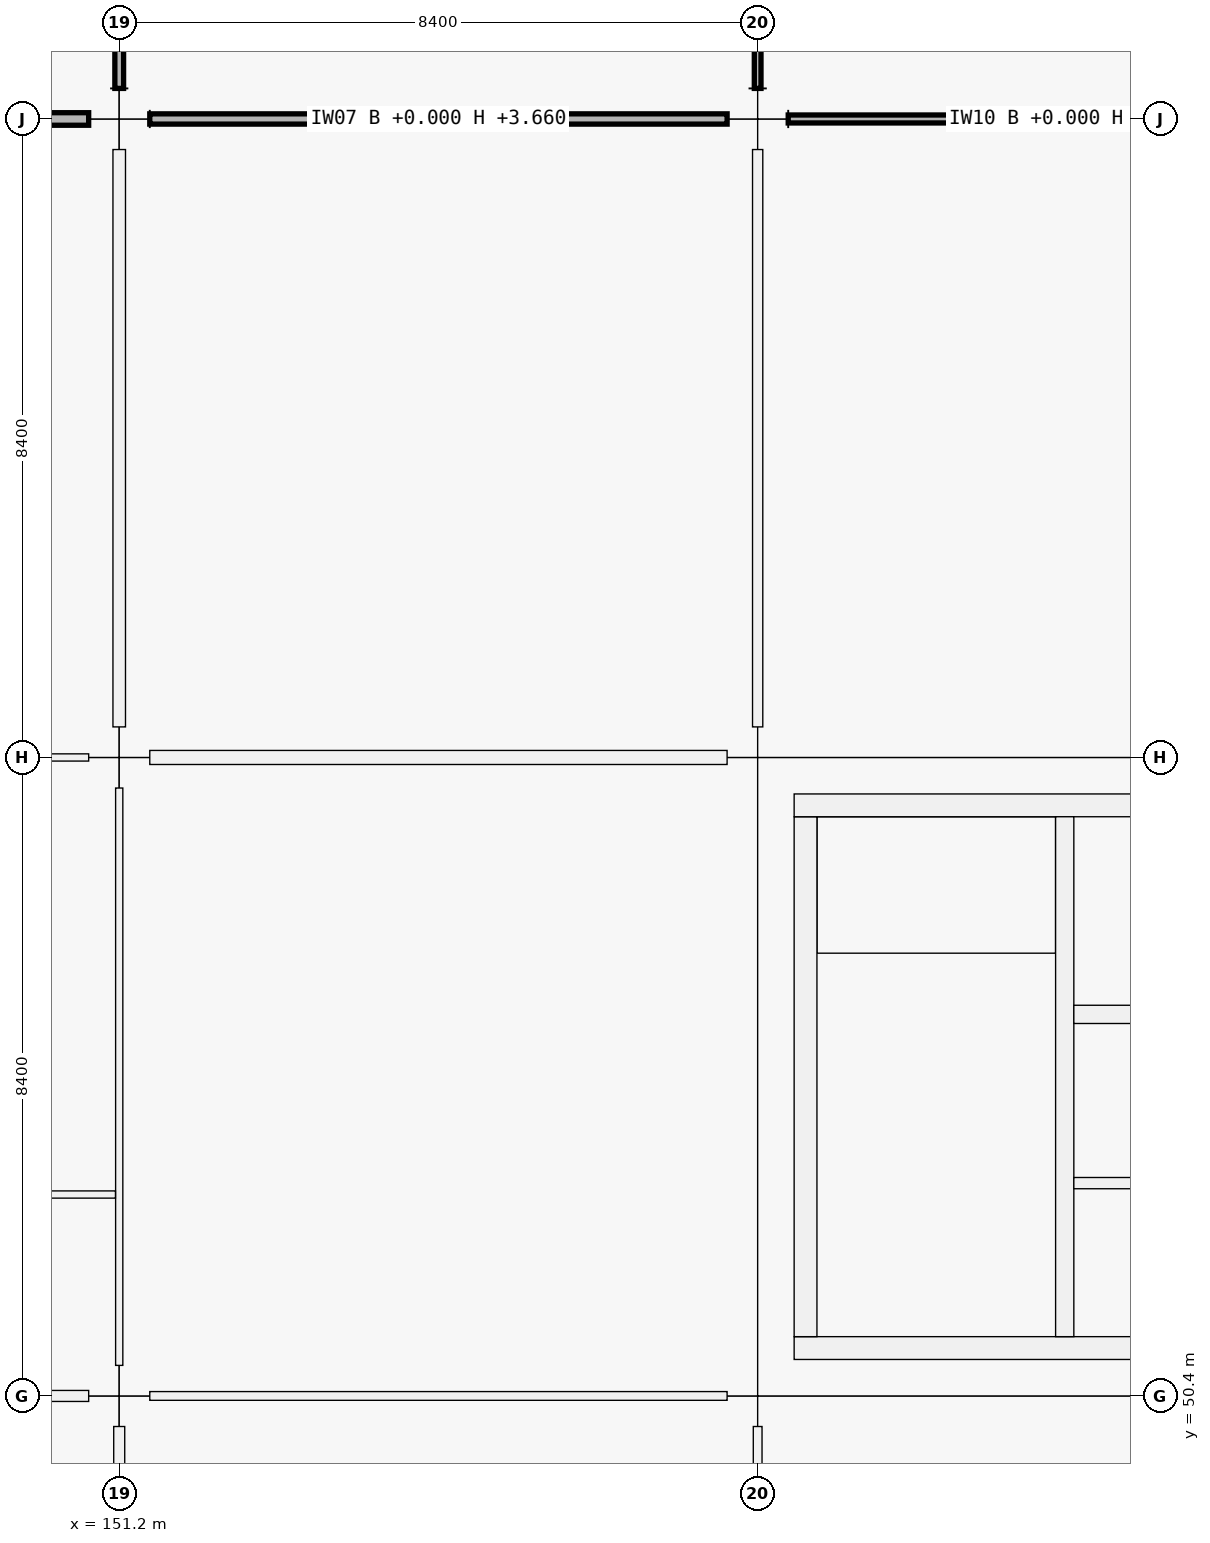
"""IFC4 building model, lengths in metres.
Left out: names, types, materials, properties, quantities, classifications, styles, units other than length and angle.
Written with IfcOpenShell. Run it as: python <this file> out.ifc"""

import sys

from ifc_helpers import new_model, si_unit, direction, frame, frame_2d, origin, origin_2d, place, context, subcontext, project, spatial, rectangle, extrude, element, fill, save


model = new_model("IFC4")
c1 = context("Model", 3, precision=1e-05, world=origin(), true_north=direction((0.0, 1.0)))
c2 = subcontext(c1, "Body", "Model", "MODEL_VIEW")
j1 = project(units=[si_unit("LENGTHUNIT", "METRE"), si_unit("PLANEANGLEUNIT", "RADIAN")], contexts=[c1])
p1 = place(None, origin())
s1 = spatial("IfcSite", under=j1, at=p1, CompositionType="ELEMENT")
p2 = place(p1, origin())
s2 = spatial("IfcBuilding", under=s1, at=p2, CompositionType="ELEMENT")
p3 = place(p2, origin())
s3 = spatial("IfcBuildingStorey", under=s2, at=p3, CompositionType="ELEMENT", Elevation=0.0)
for number, where, z_axis, x_axis in (
    (1, (151.2, 50.4, 0.0), (0.0, 0.0, 1.0), (1.0, 0.0, 0.0)),
    (2, (151.2, 58.8, 0.0), (0.0, 0.0, 1.0), (1.0, 0.0, 0.0)),
    (3, (151.2, 67.2, 0.0), (0.0, 0.0, 1.0), (1.0, 0.0, 0.0)),
    (4, (159.6, 50.4, 0.0), (0.0, 0.0, 1.0), (1.0, 0.0, 0.0)),
    (5, (159.6, 58.8, 0.0), (0.0, 0.0, 1.0), (1.0, 0.0, 0.0)),
    (6, (159.6, 67.2, 0.0), (0.0, 0.0, 1.0), (1.0, 0.0, 0.0)),
):
    element("IfcColumn", number, at=place(p3, frame(where, z_axis=z_axis, x_axis=x_axis)), inside=s3, PredefinedType="COLUMN", context=c2, shape_type="SweptSolid", body=[
        extrude(rectangle(XDim=0.8, YDim=0.8, at=origin_2d()), origin(), (0.0, 0.0, 1.0), 5.76),
    ])
p4 = place(p3, frame((167.52, 51.03, 0.0), z_axis=(0.0, 0.0, 1.0), x_axis=(-1.0, 0.0, 0.0)))
e7 = element("IfcWall", 7, at=p4, inside=s3, PredefinedType="SHEAR", context=c2, shape_type="SweptSolid", body=[
    extrude(rectangle(XDim=7.44, YDim=0.3, at=frame_2d((3.72, 0.0))), origin(), (0.0, 0.0, 1.0), 5.76),
])
p5 = place(p4, frame((1.28, 0.0, 0.0)))
e8 = element("IfcOpeningElement", 8, at=p5, cuts=e7, PredefinedType="OPENING", context=c2, shape_type="SweptSolid", body=[
    extrude(rectangle(XDim=1.5, YDim=2.15, at=frame_2d((0.75, 1.075))), frame((0.0, 0.15, 0.0), z_axis=(0.0, -1.0, 0.0), x_axis=(1.0, 0.0, 0.0)), (0.0, 0.0, 1.0), 0.3),
])
p6 = place(p3, frame((160.23, 51.18, 0.0), z_axis=(0.0, 0.0, 1.0), x_axis=(0.0, 1.0, 0.0)))
e9 = element("IfcWall", 9, at=p6, inside=s3, PredefinedType="SHEAR", context=c2, shape_type="SweptSolid", body=[
    extrude(rectangle(XDim=6.84, YDim=0.3, at=frame_2d((3.42, 0.0))), origin(), (0.0, 0.0, 1.0), 5.76),
])
p7 = place(p3, frame((160.08, 58.17, 0.0), z_axis=(0.0, 0.0, 1.0), x_axis=(1.0, 0.0, 0.0)))
e10 = element("IfcWall", 10, at=p7, inside=s3, PredefinedType="SHEAR", context=c2, shape_type="SweptSolid", body=[
    extrude(rectangle(XDim=7.44, YDim=0.3, at=frame_2d((3.72, 0.0))), origin(), (0.0, 0.0, 1.0), 5.76),
])
p8 = place(p3, frame((163.64, 51.18, 0.0), z_axis=(0.0, 0.0, 1.0), x_axis=(0.0, 1.0, 0.0)))
e11 = element("IfcWall", 11, at=p8, inside=s3, PredefinedType="SHEAR", context=c2, shape_type="SweptSolid", body=[
    extrude(rectangle(XDim=6.84, YDim=0.24, at=frame_2d((3.42, 0.0))), origin(), (0.0, 0.0, 1.0), 5.76),
])
p9 = place(p8, frame((0.12, 0.0, 0.0)))
e12 = element("IfcOpeningElement", 12, at=p9, cuts=e11, PredefinedType="OPENING", context=c2, shape_type="SweptSolid", body=[
    extrude(rectangle(XDim=1.0, YDim=2.15, at=frame_2d((0.5, 1.075))), frame((0.0, 0.12, 0.0), z_axis=(0.0, -1.0, 0.0), x_axis=(1.0, 0.0, 0.0)), (0.0, 0.0, 1.0), 0.24),
])
p10 = place(p3, frame((163.76, 55.42, 0.0), z_axis=(0.0, 0.0, 1.0), x_axis=(1.0, 0.0, 0.0)))
e13 = element("IfcWall", 13, at=p10, inside=s3, PredefinedType="SHEAR", context=c2, shape_type="SweptSolid", body=[
    extrude(rectangle(XDim=3.46, YDim=0.24, at=frame_2d((1.73, 0.0))), origin(), (0.0, 0.0, 1.0), 5.76),
])
p11 = place(p10, frame((1.08, 0.0, 0.0)))
e14 = element("IfcOpeningElement", 14, at=p11, cuts=e13, PredefinedType="OPENING", context=c2, shape_type="SweptSolid", body=[
    extrude(rectangle(XDim=1.3, YDim=2.25, at=frame_2d((0.65, 1.125))), frame((0.0, 0.12, 0.0), z_axis=(0.0, -1.0, 0.0), x_axis=(1.0, 0.0, 0.0)), (0.0, 0.0, 1.0), 0.24),
])
p12 = place(p3, frame((167.22, 53.2, 0.0), z_axis=(0.0, 0.0, 1.0), x_axis=(-1.0, 0.0, 0.0)))
e15 = element("IfcWall", 15, at=p12, inside=s3, PredefinedType="PARTITIONING", context=c2, shape_type="SweptSolid", body=[
    extrude(rectangle(XDim=3.46, YDim=0.148, at=frame_2d((1.73, 0.0))), origin(), (0.0, 0.0, 1.0), 5.51),
])
p13 = place(p12, frame((0.98, 0.0, 0.0)))
e16 = element("IfcOpeningElement", 16, at=p13, cuts=e15, PredefinedType="OPENING", context=c2, shape_type="SweptSolid", body=[
    extrude(rectangle(XDim=1.5, YDim=2.15, at=frame_2d((0.75, 1.075))), frame((0.0, 0.074, 0.0), z_axis=(0.0, -1.0, 0.0), x_axis=(1.0, 0.0, 0.0)), (0.0, 0.0, 1.0), 0.148),
])
p14 = place(p3, frame((143.202, 50.4, 0.0), z_axis=(0.0, 0.0, 1.0), x_axis=(1.0, 0.0, 0.0)))
e17 = element("IfcWall", 17, at=p14, inside=s3, PredefinedType="PARTITIONING", context=c2, shape_type="SweptSolid", body=[
    extrude(rectangle(XDim=7.596, YDim=0.145, at=frame_2d((3.798, 0.0))), origin(), (0.0, 0.0, 1.0), 3.66),
])
p15 = place(p3, frame((143.202, 58.8, 0.0), z_axis=(0.0, 0.0, 1.0), x_axis=(1.0, 0.0, 0.0)))
e18 = element("IfcWall", 18, at=p15, inside=s3, PredefinedType="PARTITIONING", context=c2, shape_type="SweptSolid", body=[
    extrude(rectangle(XDim=7.596, YDim=0.095, at=frame_2d((3.798, 0.0))), origin(), (0.0, 0.0, 1.0), 3.66),
])
p16 = place(p3, frame((143.202, 67.2, 0.0), z_axis=(0.0, 0.0, 1.0), x_axis=(1.0, 0.0, 0.0)))
e19 = element("IfcWall", 19, at=p16, inside=s3, PredefinedType="PARTITIONING", context=c2, shape_type="SweptSolid", body=[
    extrude(rectangle(XDim=7.596, YDim=0.165, at=frame_2d((3.798, 0.0))), origin(), (0.0, 0.0, 1.0), 3.66),
])
p17 = place(p16, frame((3.278, 0.0, 0.0)))
e20 = element("IfcOpeningElement", 20, at=p17, cuts=e19, PredefinedType="OPENING", context=c2, shape_type="SweptSolid", body=[
    extrude(rectangle(XDim=1.04, YDim=2.2, at=frame_2d((0.52, 1.1))), frame((0.0, 0.083, 0.0), z_axis=(0.0, -1.0, 0.0), x_axis=(1.0, 0.0, 0.0)), (0.0, 0.0, 1.0), 0.165),
])
p18 = place(p3, frame((151.602, 50.4, 0.0), z_axis=(0.0, 0.0, 1.0), x_axis=(1.0, 0.0, 0.0)))
e21 = element("IfcWall", 21, at=p18, inside=s3, PredefinedType="PARTITIONING", context=c2, shape_type="SweptSolid", body=[
    extrude(rectangle(XDim=7.596, YDim=0.115, at=frame_2d((3.798, 0.0))), origin(), (0.0, 0.0, 1.0), 3.66),
])
p19 = place(p18, frame((3.308, 0.0, 0.0)))
e22 = element("IfcOpeningElement", 22, at=p19, cuts=e21, PredefinedType="OPENING", context=c2, shape_type="SweptSolid", body=[
    extrude(rectangle(XDim=0.98, YDim=2.18, at=frame_2d((0.49, 1.09))), frame((0.0, 0.058, 0.0), z_axis=(0.0, -1.0, 0.0), x_axis=(1.0, 0.0, 0.0)), (0.0, 0.0, 1.0), 0.115),
])
p20 = place(p3, frame((151.602, 58.8, 0.0), z_axis=(0.0, 0.0, 1.0), x_axis=(1.0, 0.0, 0.0)))
e23 = element("IfcWall", 23, at=p20, inside=s3, PredefinedType="PARTITIONING", context=c2, shape_type="SweptSolid", body=[
    extrude(rectangle(XDim=7.596, YDim=0.185, at=frame_2d((3.798, 0.0))), origin(), (0.0, 0.0, 1.0), 3.66),
])
p21 = place(p20, frame((3.318, 0.0, 0.0)))
e24 = element("IfcOpeningElement", 24, at=p21, cuts=e23, PredefinedType="OPENING", context=c2, shape_type="SweptSolid", body=[
    extrude(rectangle(XDim=0.96, YDim=2.18, at=frame_2d((0.48, 1.09))), frame((0.0, 0.093, 0.0), z_axis=(0.0, -1.0, 0.0), x_axis=(1.0, 0.0, 0.0)), (0.0, 0.0, 1.0), 0.185),
])
p22 = place(p3, frame((151.602, 67.2, 0.0), z_axis=(0.0, 0.0, 1.0), x_axis=(1.0, 0.0, 0.0)))
e25 = element("IfcWall", 25, at=p22, inside=s3, PredefinedType="PARTITIONING", context=c2, shape_type="SweptSolid", body=[
    extrude(rectangle(XDim=7.596, YDim=0.135, at=frame_2d((3.798, 0.0))), origin(), (0.0, 0.0, 1.0), 3.66),
])
p23 = place(p22, frame((3.328, 0.0, 0.0)))
e26 = element("IfcOpeningElement", 26, at=p23, cuts=e25, PredefinedType="OPENING", context=c2, shape_type="SweptSolid", body=[
    extrude(rectangle(XDim=0.94, YDim=2.15, at=frame_2d((0.47, 1.075))), frame((0.0, 0.067, 0.0), z_axis=(0.0, -1.0, 0.0), x_axis=(1.0, 0.0, 0.0)), (0.0, 0.0, 1.0), 0.135),
])
p24 = place(p3, frame((160.002, 67.2, 0.0), z_axis=(0.0, 0.0, 1.0), x_axis=(1.0, 0.0, 0.0)))
e27 = element("IfcWall", 27, at=p24, inside=s3, PredefinedType="PARTITIONING", context=c2, shape_type="SweptSolid", body=[
    extrude(rectangle(XDim=7.596, YDim=0.105, at=frame_2d((3.798, 0.0))), origin(), (0.0, 0.0, 1.0), 3.66),
])
p25 = place(p24, frame((3.273, 0.0, 0.0)))
e28 = element("IfcOpeningElement", 28, at=p25, cuts=e27, PredefinedType="OPENING", context=c2, shape_type="SweptSolid", body=[
    extrude(rectangle(XDim=1.05, YDim=2.12, at=frame_2d((0.525, 1.06))), frame((0.0, 0.052, 0.0), z_axis=(0.0, -1.0, 0.0), x_axis=(1.0, 0.0, 0.0)), (0.0, 0.0, 1.0), 0.105),
])
p26 = place(p3, frame((151.2, 42.352, 0.0), z_axis=(0.0, 0.0, 1.0), x_axis=(0.0, 1.0, 0.0)))
e29 = element("IfcWall", 29, at=p26, inside=s3, PredefinedType="PARTITIONING", context=c2, shape_type="SweptSolid", body=[
    extrude(rectangle(XDim=7.646, YDim=0.145, at=frame_2d((3.823, 0.0))), origin(), (0.0, 0.0, 1.0), 3.66),
])
p27 = place(p26, frame((3.333, 0.0, 0.0)))
e30 = element("IfcOpeningElement", 30, at=p27, cuts=e29, PredefinedType="OPENING", context=c2, shape_type="SweptSolid", body=[
    extrude(rectangle(XDim=0.98, YDim=2.18, at=frame_2d((0.49, 1.09))), frame((0.0, 0.073, 0.0), z_axis=(0.0, -1.0, 0.0), x_axis=(1.0, 0.0, 0.0)), (0.0, 0.0, 1.0), 0.145),
])
p28 = place(p3, frame((151.2, 50.802, 0.0), z_axis=(0.0, 0.0, 1.0), x_axis=(0.0, 1.0, 0.0)))
e31 = element("IfcWall", 31, at=p28, inside=s3, PredefinedType="PARTITIONING", context=c2, shape_type="SweptSolid", body=[
    extrude(rectangle(XDim=7.596, YDim=0.095, at=frame_2d((3.798, 0.0))), origin(), (0.0, 0.0, 1.0), 3.66),
])
p29 = place(p3, frame((151.2, 59.202, 0.0), z_axis=(0.0, 0.0, 1.0), x_axis=(0.0, 1.0, 0.0)))
e32 = element("IfcWall", 32, at=p29, inside=s3, PredefinedType="PARTITIONING", context=c2, shape_type="SweptSolid", body=[
    extrude(rectangle(XDim=7.596, YDim=0.165, at=frame_2d((3.798, 0.0))), origin(), (0.0, 0.0, 1.0), 3.66),
])
p30 = place(p29, frame((3.318, 0.0, 0.0)))
e33 = element("IfcOpeningElement", 33, at=p30, cuts=e32, PredefinedType="OPENING", context=c2, shape_type="SweptSolid", body=[
    extrude(rectangle(XDim=0.96, YDim=2.18, at=frame_2d((0.48, 1.09))), frame((0.0, 0.083, 0.0), z_axis=(0.0, -1.0, 0.0), x_axis=(1.0, 0.0, 0.0)), (0.0, 0.0, 1.0), 0.165),
])
p31 = place(p3, frame((151.2, 67.602, 0.0), z_axis=(0.0, 0.0, 1.0), x_axis=(0.0, 1.0, 0.0)))
e34 = element("IfcWall", 34, at=p31, inside=s3, PredefinedType="PARTITIONING", context=c2, shape_type="SweptSolid", body=[
    extrude(rectangle(XDim=7.696, YDim=0.115, at=frame_2d((3.848, 0.0))), origin(), (0.0, 0.0, 1.0), 3.66),
])
p32 = place(p31, frame((3.378, 0.0, 0.0)))
e35 = element("IfcOpeningElement", 35, at=p32, cuts=e34, PredefinedType="OPENING", context=c2, shape_type="SweptSolid", body=[
    extrude(rectangle(XDim=0.94, YDim=2.15, at=frame_2d((0.47, 1.075))), frame((0.0, 0.058, 0.0), z_axis=(0.0, -1.0, 0.0), x_axis=(1.0, 0.0, 0.0)), (0.0, 0.0, 1.0), 0.115),
])
p33 = place(p3, frame((159.6, 42.402, 0.0), z_axis=(0.0, 0.0, 1.0), x_axis=(0.0, 1.0, 0.0)))
e36 = element("IfcWall", 36, at=p33, inside=s3, PredefinedType="PARTITIONING", context=c2, shape_type="SweptSolid", body=[
    extrude(rectangle(XDim=7.596, YDim=0.115, at=frame_2d((3.798, 0.0))), origin(), (0.0, 0.0, 1.0), 3.66),
])
p34 = place(p33, frame((3.338, 0.0, 0.0)))
e37 = element("IfcOpeningElement", 37, at=p34, cuts=e36, PredefinedType="OPENING", context=c2, shape_type="SweptSolid", body=[
    extrude(rectangle(XDim=0.92, YDim=2.15, at=frame_2d((0.46, 1.075))), frame((0.0, 0.058, 0.0), z_axis=(0.0, -1.0, 0.0), x_axis=(1.0, 0.0, 0.0)), (0.0, 0.0, 1.0), 0.115),
])
p35 = place(p3, frame((159.6, 59.202, 0.0), z_axis=(0.0, 0.0, 1.0), x_axis=(0.0, 1.0, 0.0)))
e38 = element("IfcWall", 38, at=p35, inside=s3, PredefinedType="PARTITIONING", context=c2, shape_type="SweptSolid", body=[
    extrude(rectangle(XDim=7.596, YDim=0.135, at=frame_2d((3.798, 0.0))), origin(), (0.0, 0.0, 1.0), 3.66),
])
p36 = place(p35, frame((3.288, 0.0, 0.0)))
e39 = element("IfcOpeningElement", 39, at=p36, cuts=e38, PredefinedType="OPENING", context=c2, shape_type="SweptSolid", body=[
    extrude(rectangle(XDim=1.02, YDim=2.2, at=frame_2d((0.51, 1.1))), frame((0.0, 0.067, 0.0), z_axis=(0.0, -1.0, 0.0), x_axis=(1.0, 0.0, 0.0)), (0.0, 0.0, 1.0), 0.135),
])
p37 = place(p3, frame((159.6, 67.602, 0.0), z_axis=(0.0, 0.0, 1.0), x_axis=(0.0, 1.0, 0.0)))
e40 = element("IfcWall", 40, at=p37, inside=s3, PredefinedType="PARTITIONING", context=c2, shape_type="SweptSolid", body=[
    extrude(rectangle(XDim=7.671, YDim=0.088, at=frame_2d((3.835, 0.0))), origin(), (0.0, 0.0, 1.0), 3.66),
])
p38 = place(p37, frame((3.331, 0.0, 0.0)))
e41 = element("IfcOpeningElement", 41, at=p38, cuts=e40, PredefinedType="OPENING", context=c2, shape_type="SweptSolid", body=[
    extrude(rectangle(XDim=1.01, YDim=2.12, at=frame_2d((0.505, 1.06))), frame((0.0, 0.044, 0.0), z_axis=(0.0, -1.0, 0.0), x_axis=(1.0, 0.0, 0.0)), (0.0, 0.0, 1.0), 0.088),
])
p39 = place(p3, frame((142.865, 53.05, 0.0), z_axis=(0.0, 0.0, 1.0), x_axis=(1.0, 0.0, 0.0)))
e42 = element("IfcWall", 42, at=p39, inside=s3, PredefinedType="PARTITIONING", context=c2, shape_type="SweptSolid", body=[
    extrude(rectangle(XDim=8.286, YDim=0.095, at=frame_2d((4.143, 0.0))), origin(), (0.0, 0.0, 1.0), 3.66),
])
p40 = place(p9, origin())
e43 = element("IfcDoor", 43, at=p40, inside=s3, OperationType="SINGLE_SWING_LEFT", PredefinedType="DOOR", context=c2, shape_type="SweptSolid", body=[
    extrude(rectangle(XDim=1.0, YDim=2.15, at=frame_2d((0.5, 1.075))), frame((0.0, 0.025, 0.0), z_axis=(0.0, -1.0, 0.0), x_axis=(1.0, 0.0, 0.0)), (0.0, 0.0, 1.0), 0.05),
])
fill(e12, e43)
p41 = place(p19, origin())
e44 = element("IfcDoor", 44, at=p41, inside=s3, OperationType="SINGLE_SWING_RIGHT", PredefinedType="DOOR", context=c2, shape_type="SweptSolid", body=[
    extrude(rectangle(XDim=0.98, YDim=2.18, at=frame_2d((0.49, 1.09))), frame((0.0, 0.025, 0.0), z_axis=(0.0, -1.0, 0.0), x_axis=(1.0, 0.0, 0.0)), (0.0, 0.0, 1.0), 0.05),
])
fill(e22, e44)
p42 = place(p21, origin())
e45 = element("IfcDoor", 45, at=p42, inside=s3, OperationType="SINGLE_SWING_LEFT", PredefinedType="DOOR", context=c2, shape_type="SweptSolid", body=[
    extrude(rectangle(XDim=0.96, YDim=2.18, at=frame_2d((0.48, 1.09))), frame((0.0, 0.025, 0.0), z_axis=(0.0, -1.0, 0.0), x_axis=(1.0, 0.0, 0.0)), (0.0, 0.0, 1.0), 0.05),
])
fill(e24, e45)
p43 = place(p23, origin())
e46 = element("IfcDoor", 46, at=p43, inside=s3, OperationType="SINGLE_SWING_RIGHT", PredefinedType="DOOR", context=c2, shape_type="SweptSolid", body=[
    extrude(rectangle(XDim=0.94, YDim=2.15, at=frame_2d((0.47, 1.075))), frame((0.0, 0.025, 0.0), z_axis=(0.0, -1.0, 0.0), x_axis=(1.0, 0.0, 0.0)), (0.0, 0.0, 1.0), 0.05),
])
fill(e26, e46)
p44 = place(p25, origin())
e47 = element("IfcDoor", 47, at=p44, inside=s3, OperationType="SINGLE_SWING_RIGHT", PredefinedType="DOOR", context=c2, shape_type="SweptSolid", body=[
    extrude(rectangle(XDim=1.05, YDim=2.12, at=frame_2d((0.525, 1.06))), frame((0.0, 0.025, 0.0), z_axis=(0.0, -1.0, 0.0), x_axis=(1.0, 0.0, 0.0)), (0.0, 0.0, 1.0), 0.05),
])
fill(e28, e47)
p45 = place(p36, origin())
e48 = element("IfcDoor", 48, at=p45, inside=s3, OperationType="SINGLE_SWING_LEFT", PredefinedType="DOOR", context=c2, shape_type="SweptSolid", body=[
    extrude(rectangle(XDim=1.02, YDim=2.2, at=frame_2d((0.51, 1.1))), frame((0.0, 0.025, 0.0), z_axis=(0.0, -1.0, 0.0), x_axis=(1.0, 0.0, 0.0)), (0.0, 0.0, 1.0), 0.05),
])
fill(e39, e48)
p46 = place(p30, origin())
e49 = element("IfcDoor", 49, at=p46, inside=s3, OperationType="SINGLE_SWING_RIGHT", PredefinedType="DOOR", context=c2, shape_type="SweptSolid", body=[
    extrude(rectangle(XDim=0.96, YDim=2.18, at=frame_2d((0.48, 1.09))), frame((0.0, 0.025, 0.0), z_axis=(0.0, -1.0, 0.0), x_axis=(1.0, 0.0, 0.0)), (0.0, 0.0, 1.0), 0.05),
])
fill(e33, e49)
save(model, sys.argv[1])
